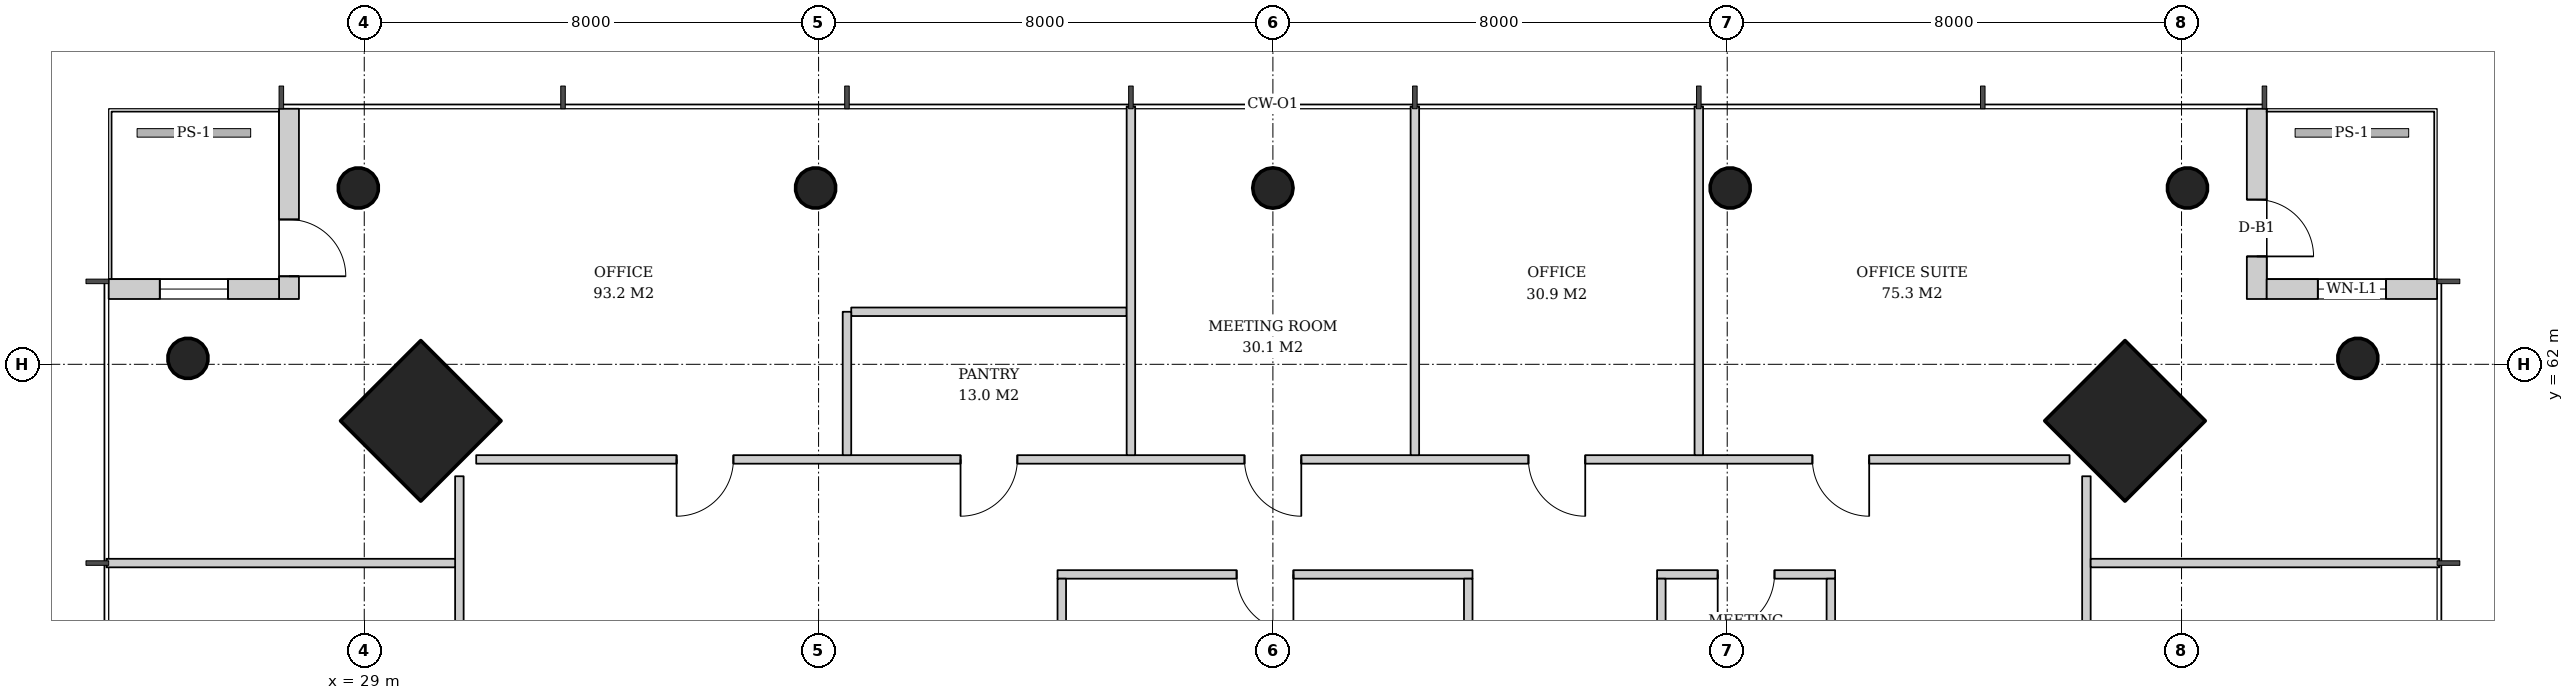
"""IFC4 building model, lengths in metres.
Left out: names, types, materials, properties, quantities, classifications, styles, units other than length and angle.
Written with IfcOpenShell. Run it as: python <this file> out.ifc"""

import sys

from ifc_helpers import new_model, si_unit, direction, frame, frame_2d, origin, origin_2d, place, context, subcontext, project, spatial, rectangle, hollow_circle, extrude, element, fill, save


model = new_model("IFC4")
c1 = context("Model", 3, precision=1e-05, world=origin(), true_north=direction((0.0, 1.0)))
c2 = subcontext(c1, "Body", "Model", "MODEL_VIEW")
j1 = project(units=[si_unit("LENGTHUNIT", "METRE"), si_unit("PLANEANGLEUNIT", "RADIAN")], contexts=[c1])
p1 = place(None, origin())
s1 = spatial("IfcSite", under=j1, at=p1, CompositionType="ELEMENT")
p2 = place(p1, origin())
s2 = spatial("IfcBuilding", under=s1, at=p2, CompositionType="ELEMENT")
p3 = place(p2, frame((0.0, 0.0, 173.0)))
s3 = spatial("IfcBuildingStorey", under=s2, at=p3, CompositionType="ELEMENT", Elevation=173.0)
p4 = place(p3, frame((60.043, 61.043, 0.0), z_axis=(-0.031962158256, -0.031962158256, 0.998977898093), x_axis=(0.707106781187, -0.707106781187, 0.0)))
e1 = element("IfcColumn", 1, at=p4, inside=s3, PredefinedType="COLUMN", context=c2, shape_type="SweptSolid", body=[
    extrude(rectangle(XDim=2.0, YDim=2.0, at=origin_2d()), origin(), (0.0, 0.0, 1.0), 3.804),
])
p5 = place(p3, frame((64.143, 62.143, 0.0), z_axis=(-0.031898107953, -0.031898107953, 0.998981992539), x_axis=(0.707106781187, -0.707106781187, 0.0)))
e2 = element("IfcColumn", 2, at=p5, inside=s3, PredefinedType="COLUMN", context=c2, shape_type="SweptSolid", body=[
    extrude(hollow_circle(Radius=0.355, WallThickness=0.025, at=origin_2d()), origin(), (0.0, 0.0, 1.0), 3.804),
])
p6 = place(p3, frame((29.957, 61.043, 0.0), z_axis=(0.031962158256, -0.031962158256, 0.998977898093), x_axis=(0.707106781187, 0.707106781187, 0.0)))
e3 = element("IfcColumn", 3, at=p6, inside=s3, PredefinedType="COLUMN", context=c2, shape_type="SweptSolid", body=[
    extrude(rectangle(XDim=2.0, YDim=2.0, at=origin_2d()), origin(), (0.0, 0.0, 1.0), 3.804),
])
for number, where, z_axis, x_axis in (
    (4, (61.143, 65.143, 0.0), (-0.032, -0.032, 0.999), (0.707, -0.707, 0.0)),
    (5, (28.857, 65.143, 0.0), (0.032, -0.032, 0.999), (0.707, 0.707, 0.0)),
):
    element("IfcColumn", number, at=place(p3, frame(where, z_axis=z_axis, x_axis=x_axis)), inside=s3, PredefinedType="COLUMN", context=c2, shape_type="SweptSolid", body=[
        extrude(hollow_circle(Radius=0.355, WallThickness=0.025, at=origin_2d()), origin(), (0.0, 0.0, 1.0), 3.804),
    ])
p7 = place(p3, frame((53.072, 65.143, 0.0), z_axis=(-0.015987237665, -0.031910269556, 0.999362868496), x_axis=(0.894067115991, -0.447933021895, 0.0)))
e6 = element("IfcColumn", 6, at=p7, inside=s3, PredefinedType="COLUMN", context=c2, shape_type="SweptSolid", body=[
    extrude(hollow_circle(Radius=0.355, WallThickness=0.025, at=origin_2d()), origin(), (0.0, 0.0, 1.0), 3.802),
])
p8 = place(p3, frame((45.0, 65.143, 0.0), z_axis=(0.0, -0.031914348339, 0.999490607445), x_axis=(1.0, 0.0, 0.0)))
e7 = element("IfcColumn", 7, at=p8, inside=s3, PredefinedType="COLUMN", context=c2, shape_type="SweptSolid", body=[
    extrude(hollow_circle(Radius=0.355, WallThickness=0.025, at=origin_2d()), origin(), (0.0, 0.0, 1.0), 3.802),
])
p9 = place(p3, frame((36.928, 65.143, 0.0), z_axis=(0.015987237665, -0.031910269556, 0.999362868496), x_axis=(0.894067115991, 0.447933021895, 0.0)))
e8 = element("IfcColumn", 8, at=p9, inside=s3, PredefinedType="COLUMN", context=c2, shape_type="SweptSolid", body=[
    extrude(hollow_circle(Radius=0.355, WallThickness=0.025, at=origin_2d()), origin(), (0.0, 0.0, 1.0), 3.802),
])
p10 = place(p3, frame((25.857, 62.143, 0.0), z_axis=(0.031898107953, -0.031898107953, 0.998981992539), x_axis=(0.707106781187, 0.707106781187, 0.0)))
e9 = element("IfcColumn", 9, at=p10, inside=s3, PredefinedType="COLUMN", context=c2, shape_type="SweptSolid", body=[
    extrude(hollow_circle(Radius=0.355, WallThickness=0.025, at=origin_2d()), origin(), (0.0, 0.0, 1.0), 3.804),
])
p11 = place(p3, frame((62.325, 66.5, 0.0), z_axis=(0.0, 0.0, 1.0), x_axis=(0.0, -1.0, 0.0)))
e10 = element("IfcWall", 10, at=p11, inside=s3, PredefinedType="SOLIDWALL", context=c2, shape_type="SweptSolid", body=[
    extrude(rectangle(XDim=3.35, YDim=0.35, at=frame_2d((1.675, 0.0))), origin(), (0.0, 0.0, 1.0), 3.62),
])
p12 = place(p11, frame((1.6, 0.0, 0.0)))
e11 = element("IfcOpeningElement", 11, at=p12, cuts=e10, PredefinedType="OPENING", context=c2, shape_type="SweptSolid", body=[
    extrude(rectangle(XDim=1.0, YDim=2.4, at=frame_2d((0.5, 1.2))), frame((0.0, 0.185, 0.0), z_axis=(0.0, -1.0, 0.0), x_axis=(1.0, 0.0, 0.0)), (0.0, 0.0, 1.0), 0.37),
])
p13 = place(p3, frame((62.5, 63.325, 0.0), z_axis=(0.0, 0.0, 1.0), x_axis=(1.0, 0.0, 0.0)))
e12 = element("IfcWall", 12, at=p13, inside=s3, PredefinedType="SOLIDWALL", context=c2, shape_type="SweptSolid", body=[
    extrude(rectangle(XDim=3.0, YDim=0.35, at=frame_2d((1.5, 0.0))), origin(), (0.0, 0.0, 1.0), 3.62),
])
p14 = place(p13, frame((0.9, 0.0, 0.6)))
e13 = element("IfcOpeningElement", 13, at=p14, cuts=e12, PredefinedType="OPENING", context=c2, shape_type="SweptSolid", body=[
    extrude(rectangle(XDim=1.2, YDim=2.55, at=frame_2d((0.6, 1.275))), frame((0.0, 0.185, 0.0), z_axis=(0.0, -1.0, 0.0), x_axis=(1.0, 0.0, 0.0)), (0.0, 0.0, 1.0), 0.37),
])
p15 = place(p3, frame((27.675, 66.5, 0.0), z_axis=(0.0, 0.0, 1.0), x_axis=(0.0, -1.0, 0.0)))
e14 = element("IfcWall", 14, at=p15, inside=s3, PredefinedType="SOLIDWALL", context=c2, shape_type="SweptSolid", body=[
    extrude(rectangle(XDim=3.35, YDim=0.35, at=frame_2d((1.675, 0.0))), origin(), (0.0, 0.0, 1.0), 3.62),
])
p16 = place(p15, frame((1.95, 0.0, 0.0)))
e15 = element("IfcOpeningElement", 15, at=p16, cuts=e14, PredefinedType="OPENING", context=c2, shape_type="SweptSolid", body=[
    extrude(rectangle(XDim=1.0, YDim=2.4, at=frame_2d((0.5, 1.2))), frame((0.0, 0.185, 0.0), z_axis=(0.0, -1.0, 0.0), x_axis=(1.0, 0.0, 0.0)), (0.0, 0.0, 1.0), 0.37),
])
p17 = place(p3, frame((27.5, 63.325, 0.0), z_axis=(0.0, 0.0, 1.0), x_axis=(-1.0, 0.0, 0.0)))
e16 = element("IfcWall", 16, at=p17, inside=s3, PredefinedType="SOLIDWALL", context=c2, shape_type="SweptSolid", body=[
    extrude(rectangle(XDim=3.0, YDim=0.35, at=frame_2d((1.5, 0.0))), origin(), (0.0, 0.0, 1.0), 3.62),
])
p18 = place(p17, frame((0.9, 0.0, 0.6)))
e17 = element("IfcOpeningElement", 17, at=p18, cuts=e16, PredefinedType="OPENING", context=c2, shape_type="SweptSolid", body=[
    extrude(rectangle(XDim=1.2, YDim=2.55, at=frame_2d((0.6, 1.275))), frame((0.0, 0.185, 0.0), z_axis=(0.0, -1.0, 0.0), x_axis=(1.0, 0.0, 0.0)), (0.0, 0.0, 1.0), 0.37),
])
p19 = place(p3, frame((54.9, 58.3, 0.0), z_axis=(0.0, 0.0, 1.0), x_axis=(-1.0, 0.0, 0.0)))
e18 = element("IfcWall", 18, at=p19, inside=s3, PredefinedType="PARTITIONING", context=c2, shape_type="SweptSolid", body=[
    extrude(rectangle(XDim=3.135, YDim=0.15, at=frame_2d((1.567, 0.0))), origin(), (0.0, 0.0, 1.0), 2.92),
])
p20 = place(p19, frame((1.067, 0.0, 0.0)))
e19 = element("IfcOpeningElement", 19, at=p20, cuts=e18, PredefinedType="OPENING", context=c2, shape_type="SweptSolid", body=[
    extrude(rectangle(XDim=1.0, YDim=2.1, at=frame_2d((0.5, 1.05))), frame((0.0, 0.085, 0.0), z_axis=(0.0, -1.0, 0.0), x_axis=(1.0, 0.0, 0.0)), (0.0, 0.0, 1.0), 0.17),
])
p21 = place(p3, frame((54.825, 55.9, 0.0), z_axis=(0.0, 0.0, 1.0), x_axis=(0.0, 1.0, 0.0)))
e20 = element("IfcWall", 20, at=p21, inside=s3, PredefinedType="PARTITIONING", context=c2, shape_type="SweptSolid", body=[
    extrude(rectangle(XDim=2.325, YDim=0.15, at=frame_2d((1.163, 0.0))), origin(), (0.0, 0.0, 1.0), 2.867),
])
p22 = place(p3, frame((51.84, 55.9, 0.0), z_axis=(0.0, 0.0, 1.0), x_axis=(0.0, 1.0, 0.0)))
e21 = element("IfcWall", 21, at=p22, inside=s3, PredefinedType="PARTITIONING", context=c2, shape_type="SweptSolid", body=[
    extrude(rectangle(XDim=2.325, YDim=0.15, at=frame_2d((1.163, 0.0))), origin(), (0.0, 0.0, 1.0), 3.62),
])
p23 = place(p3, frame((48.515, 58.3, 0.0), z_axis=(0.0, 0.0, 1.0), x_axis=(-1.0, 0.0, 0.0)))
e22 = element("IfcWall", 22, at=p23, inside=s3, PredefinedType="PARTITIONING", context=c2, shape_type="SweptSolid", body=[
    extrude(rectangle(XDim=7.307, YDim=0.15, at=frame_2d((3.654, 0.0))), origin(), (0.0, 0.0, 1.0), 2.867),
])
p24 = place(p23, frame((3.154, 0.0, 0.0)))
e23 = element("IfcOpeningElement", 23, at=p24, cuts=e22, PredefinedType="OPENING", context=c2, shape_type="SweptSolid", body=[
    extrude(rectangle(XDim=1.0, YDim=2.1, at=frame_2d((0.5, 1.05))), frame((0.0, 0.085, 0.0), z_axis=(0.0, -1.0, 0.0), x_axis=(1.0, 0.0, 0.0)), (0.0, 0.0, 1.0), 0.17),
])
for number, where, z_axis, x_axis in (
    (24, (48.44, 55.9, 0.0), (0.0, 0.0, 1.0), (0.0, 1.0, 0.0)),
    (25, (41.283, 55.9, 0.0), (0.0, 0.0, 1.0), (0.0, 1.0, 0.0)),
):
    element("IfcWall", number, at=place(p3, frame(where, z_axis=z_axis, x_axis=x_axis)), inside=s3, PredefinedType="PARTITIONING", context=c2, shape_type="SweptSolid", body=[
        extrude(rectangle(XDim=2.325, YDim=0.15, at=frame_2d((1.163, 0.0))), origin(), (0.0, 0.0, 1.0), 3.62),
    ])
p25 = place(p3, frame((59.325, 31.971, 0.0), z_axis=(0.0, 0.0, 1.0), x_axis=(0.0, 1.0, 0.0)))
e26 = element("IfcWall", 26, at=p25, inside=s3, PredefinedType="PARTITIONING", context=c2, shape_type="SweptSolid", body=[
    extrude(rectangle(XDim=28.057, YDim=0.15, at=frame_2d((14.029, 0.0))), origin(), (0.0, 0.0, 1.0), 2.867),
])
p26 = place(p25, frame((3.129, 0.0, 0.0)))
e27 = element("IfcOpeningElement", 27, at=p26, cuts=e26, PredefinedType="OPENING", context=c2, shape_type="SweptSolid", body=[
    extrude(rectangle(XDim=1.8, YDim=2.4, at=frame_2d((0.9, 1.2))), frame((0.0, 0.085, 0.0), z_axis=(0.0, -1.0, 0.0), x_axis=(1.0, 0.0, 0.0)), (0.0, 0.0, 1.0), 0.17),
])
p27 = place(p3, frame((59.4, 58.5, 0.0), z_axis=(0.0, 0.0, 1.0), x_axis=(1.0, 0.0, 0.0)))
e28 = element("IfcWall", 28, at=p27, inside=s3, PredefinedType="PARTITIONING", context=c2, shape_type="SweptSolid", body=[
    extrude(rectangle(XDim=6.14, YDim=0.15, at=frame_2d((3.07, 0.0))), origin(), (0.0, 0.0, 1.0), 3.12),
])
p28 = place(p3, frame((42.425, 62.925, 0.0), z_axis=(0.0, 0.0, 1.0), x_axis=(-1.0, 0.0, 0.0)))
e29 = element("IfcWall", 29, at=p28, inside=s3, PredefinedType="PARTITIONING", context=c2, shape_type="SweptSolid", body=[
    extrude(rectangle(XDim=4.85, YDim=0.15, at=frame_2d((2.425, 0.0))), origin(), (0.0, 0.0, 1.0), 2.867),
])
p29 = place(p3, frame((59.029, 60.325, 0.0), z_axis=(0.0, 0.0, 1.0), x_axis=(-1.0, 0.0, 0.0)))
e30 = element("IfcWall", 30, at=p29, inside=s3, PredefinedType="PARTITIONING", context=c2, shape_type="SweptSolid", body=[
    extrude(rectangle(XDim=28.057, YDim=0.15, at=frame_2d((14.029, 0.0))), origin(), (0.0, 0.0, 1.0), 2.867),
])
p30 = place(p29, frame((3.529, 0.0, 0.0)))
e31 = element("IfcOpeningElement", 31, at=p30, cuts=e30, PredefinedType="OPENING", context=c2, shape_type="SweptSolid", body=[
    extrude(rectangle(XDim=1.0, YDim=2.1, at=frame_2d((0.5, 1.05))), frame((0.0, 0.085, 0.0), z_axis=(0.0, -1.0, 0.0), x_axis=(1.0, 0.0, 0.0)), (0.0, 0.0, 1.0), 0.17),
])
p31 = place(p29, frame((8.529, 0.0, 0.0)))
e32 = element("IfcOpeningElement", 32, at=p31, cuts=e30, PredefinedType="OPENING", context=c2, shape_type="SweptSolid", body=[
    extrude(rectangle(XDim=1.0, YDim=2.1, at=frame_2d((0.5, 1.05))), frame((0.0, 0.085, 0.0), z_axis=(0.0, -1.0, 0.0), x_axis=(1.0, 0.0, 0.0)), (0.0, 0.0, 1.0), 0.17),
])
p32 = place(p29, frame((13.529, 0.0, 0.0)))
e33 = element("IfcOpeningElement", 33, at=p32, cuts=e30, PredefinedType="OPENING", context=c2, shape_type="SweptSolid", body=[
    extrude(rectangle(XDim=1.0, YDim=2.1, at=frame_2d((0.5, 1.05))), frame((0.0, 0.085, 0.0), z_axis=(0.0, -1.0, 0.0), x_axis=(1.0, 0.0, 0.0)), (0.0, 0.0, 1.0), 0.17),
])
p33 = place(p29, frame((18.529, 0.0, 0.0)))
e34 = element("IfcOpeningElement", 34, at=p33, cuts=e30, PredefinedType="OPENING", context=c2, shape_type="SweptSolid", body=[
    extrude(rectangle(XDim=1.0, YDim=2.1, at=frame_2d((0.5, 1.05))), frame((0.0, 0.085, 0.0), z_axis=(0.0, -1.0, 0.0), x_axis=(1.0, 0.0, 0.0)), (0.0, 0.0, 1.0), 0.17),
])
p34 = place(p29, frame((23.529, 0.0, 0.0)))
e35 = element("IfcOpeningElement", 35, at=p34, cuts=e30, PredefinedType="OPENING", context=c2, shape_type="SweptSolid", body=[
    extrude(rectangle(XDim=1.0, YDim=2.1, at=frame_2d((0.5, 1.05))), frame((0.0, 0.085, 0.0), z_axis=(0.0, -1.0, 0.0), x_axis=(1.0, 0.0, 0.0)), (0.0, 0.0, 1.0), 0.17),
])
for number, where, z_axis, x_axis in (
    (36, (52.5, 60.4, 0.0), (0.0, 0.0, 1.0), (0.0, 1.0, 0.0)),
    (37, (47.5, 60.4, 0.0), (0.0, 0.0, 1.0), (0.0, 1.0, 0.0)),
):
    element("IfcWall", number, at=place(p3, frame(where, z_axis=z_axis, x_axis=x_axis)), inside=s3, PredefinedType="PARTITIONING", context=c2, shape_type="SweptSolid", body=[
        extrude(rectangle(XDim=6.14, YDim=0.15, at=frame_2d((3.07, 0.0))), origin(), (0.0, 0.0, 1.0), 3.12),
    ])
p35 = place(p3, frame((42.5, 60.4, 0.0), z_axis=(0.0, 0.0, 1.0), x_axis=(0.0, 1.0, 0.0)))
e38 = element("IfcWall", 38, at=p35, inside=s3, PredefinedType="PARTITIONING", context=c2, shape_type="SweptSolid", body=[
    extrude(rectangle(XDim=6.14, YDim=0.15, at=frame_2d((3.07, 0.0))), origin(), (0.0, 0.0, 1.0), 2.867),
])
p36 = place(p3, frame((37.5, 60.4, 0.0), z_axis=(0.0, 0.0, 1.0), x_axis=(0.0, 1.0, 0.0)))
e39 = element("IfcWall", 39, at=p36, inside=s3, PredefinedType="PARTITIONING", context=c2, shape_type="SweptSolid", body=[
    extrude(rectangle(XDim=2.525, YDim=0.15, at=frame_2d((1.263, 0.0))), origin(), (0.0, 0.0, 1.0), 3.62),
])
p37 = place(p3, frame((30.675, 60.029, 0.0), z_axis=(0.0, 0.0, 1.0), x_axis=(0.0, -1.0, 0.0)))
e40 = element("IfcWall", 40, at=p37, inside=s3, PredefinedType="PARTITIONING", context=c2, shape_type="SweptSolid", body=[
    extrude(rectangle(XDim=28.057, YDim=0.15, at=frame_2d((14.029, 0.0))), origin(), (0.0, 0.0, 1.0), 2.867),
])
p38 = place(p37, frame((3.529, 0.0, 0.0)))
e41 = element("IfcOpeningElement", 41, at=p38, cuts=e40, PredefinedType="OPENING", context=c2, shape_type="SweptSolid", body=[
    extrude(rectangle(XDim=1.0, YDim=2.1, at=frame_2d((0.5, 1.05))), frame((0.0, 0.085, 0.0), z_axis=(0.0, -1.0, 0.0), x_axis=(1.0, 0.0, 0.0)), (0.0, 0.0, 1.0), 0.17),
])
p39 = place(p37, frame((8.529, 0.0, 0.0)))
e42 = element("IfcOpeningElement", 42, at=p39, cuts=e40, PredefinedType="OPENING", context=c2, shape_type="SweptSolid", body=[
    extrude(rectangle(XDim=1.0, YDim=2.1, at=frame_2d((0.5, 1.05))), frame((0.0, 0.085, 0.0), z_axis=(0.0, -1.0, 0.0), x_axis=(1.0, 0.0, 0.0)), (0.0, 0.0, 1.0), 0.17),
])
p40 = place(p37, frame((13.629, 0.0, 0.0)))
e43 = element("IfcOpeningElement", 43, at=p40, cuts=e40, PredefinedType="OPENING", context=c2, shape_type="SweptSolid", body=[
    extrude(rectangle(XDim=0.8, YDim=2.1, at=frame_2d((0.4, 1.05))), frame((0.0, 0.085, 0.0), z_axis=(0.0, -1.0, 0.0), x_axis=(1.0, 0.0, 0.0)), (0.0, 0.0, 1.0), 0.17),
])
p41 = place(p37, frame((18.529, 0.0, 0.0)))
e44 = element("IfcOpeningElement", 44, at=p41, cuts=e40, PredefinedType="OPENING", context=c2, shape_type="SweptSolid", body=[
    extrude(rectangle(XDim=1.0, YDim=2.1, at=frame_2d((0.5, 1.05))), frame((0.0, 0.085, 0.0), z_axis=(0.0, -1.0, 0.0), x_axis=(1.0, 0.0, 0.0)), (0.0, 0.0, 1.0), 0.17),
])
p42 = place(p37, frame((23.629, 0.0, 0.0)))
e45 = element("IfcOpeningElement", 45, at=p42, cuts=e40, PredefinedType="OPENING", context=c2, shape_type="SweptSolid", body=[
    extrude(rectangle(XDim=0.8, YDim=2.1, at=frame_2d((0.4, 1.05))), frame((0.0, 0.085, 0.0), z_axis=(0.0, -1.0, 0.0), x_axis=(1.0, 0.0, 0.0)), (0.0, 0.0, 1.0), 0.17),
])
p43 = place(p3, frame((30.6, 58.5, 0.0), z_axis=(0.0, 0.0, 1.0), x_axis=(-1.0, 0.0, 0.0)))
e46 = element("IfcWall", 46, at=p43, inside=s3, PredefinedType="PARTITIONING", context=c2, shape_type="SweptSolid", body=[
    extrude(rectangle(XDim=6.14, YDim=0.15, at=frame_2d((3.07, 0.0))), origin(), (0.0, 0.0, 1.0), 3.12),
])
p44 = place(p12, origin())
e47 = element("IfcDoor", 47, at=p44, inside=s3, OperationType="SINGLE_SWING_RIGHT", PredefinedType="DOOR", context=c2, shape_type="SweptSolid", body=[
    extrude(rectangle(XDim=1.0, YDim=2.4, at=frame_2d((0.5, 1.2))), frame((0.0, 0.025, 0.0), z_axis=(0.0, -1.0, 0.0), x_axis=(1.0, 0.0, 0.0)), (0.0, 0.0, 1.0), 0.05),
])
fill(e11, e47)
p45 = place(p14, origin())
e48 = element("IfcWindow", 48, at=p45, inside=s3, PartitioningType="SINGLE_PANEL", PredefinedType="WINDOW", context=c2, shape_type="SweptSolid", body=[
    extrude(rectangle(XDim=1.2, YDim=2.55, at=frame_2d((0.6, 1.275))), frame((0.0, 0.03, 0.0), z_axis=(0.0, -1.0, 0.0), x_axis=(1.0, 0.0, 0.0)), (0.0, 0.0, 1.0), 0.06),
])
fill(e13, e48)
p46 = place(p16, origin())
e49 = element("IfcDoor", 49, at=p46, inside=s3, OperationType="SINGLE_SWING_RIGHT", PredefinedType="DOOR", context=c2, shape_type="SweptSolid", body=[
    extrude(rectangle(XDim=1.0, YDim=2.4, at=frame_2d((0.5, 1.2))), frame((0.0, 0.025, 0.0), z_axis=(0.0, -1.0, 0.0), x_axis=(1.0, 0.0, 0.0)), (0.0, 0.0, 1.0), 0.05),
])
fill(e15, e49)
p47 = place(p18, origin())
e50 = element("IfcWindow", 50, at=p47, inside=s3, PartitioningType="SINGLE_PANEL", PredefinedType="WINDOW", context=c2, shape_type="SweptSolid", body=[
    extrude(rectangle(XDim=1.2, YDim=2.55, at=frame_2d((0.6, 1.275))), frame((0.0, 0.03, 0.0), z_axis=(0.0, -1.0, 0.0), x_axis=(1.0, 0.0, 0.0)), (0.0, 0.0, 1.0), 0.06),
])
fill(e17, e50)
p48 = place(p20, origin())
e51 = element("IfcDoor", 51, at=p48, inside=s3, OperationType="SINGLE_SWING_RIGHT", PredefinedType="DOOR", context=c2, shape_type="SweptSolid", body=[
    extrude(rectangle(XDim=1.0, YDim=2.1, at=frame_2d((0.5, 1.05))), frame((0.0, 0.025, 0.0), z_axis=(0.0, -1.0, 0.0), x_axis=(1.0, 0.0, 0.0)), (0.0, 0.0, 1.0), 0.05),
])
fill(e19, e51)
p49 = place(p24, origin())
e52 = element("IfcDoor", 52, at=p49, inside=s3, OperationType="SINGLE_SWING_LEFT", PredefinedType="DOOR", context=c2, shape_type="SweptSolid", body=[
    extrude(rectangle(XDim=1.0, YDim=2.1, at=frame_2d((0.5, 1.05))), frame((0.0, 0.025, 0.0), z_axis=(0.0, -1.0, 0.0), x_axis=(1.0, 0.0, 0.0)), (0.0, 0.0, 1.0), 0.05),
])
fill(e23, e52)
p50 = place(p30, origin())
e53 = element("IfcDoor", 53, at=p50, inside=s3, OperationType="SINGLE_SWING_LEFT", PredefinedType="DOOR", context=c2, shape_type="SweptSolid", body=[
    extrude(rectangle(XDim=1.0, YDim=2.1, at=frame_2d((0.5, 1.05))), frame((0.0, 0.025, 0.0), z_axis=(0.0, -1.0, 0.0), x_axis=(1.0, 0.0, 0.0)), (0.0, 0.0, 1.0), 0.05),
])
fill(e31, e53)
p51 = place(p31, origin())
e54 = element("IfcDoor", 54, at=p51, inside=s3, OperationType="SINGLE_SWING_LEFT", PredefinedType="DOOR", context=c2, shape_type="SweptSolid", body=[
    extrude(rectangle(XDim=1.0, YDim=2.1, at=frame_2d((0.5, 1.05))), frame((0.0, 0.025, 0.0), z_axis=(0.0, -1.0, 0.0), x_axis=(1.0, 0.0, 0.0)), (0.0, 0.0, 1.0), 0.05),
])
fill(e32, e54)
p52 = place(p32, origin())
e55 = element("IfcDoor", 55, at=p52, inside=s3, OperationType="SINGLE_SWING_LEFT", PredefinedType="DOOR", context=c2, shape_type="SweptSolid", body=[
    extrude(rectangle(XDim=1.0, YDim=2.1, at=frame_2d((0.5, 1.05))), frame((0.0, 0.025, 0.0), z_axis=(0.0, -1.0, 0.0), x_axis=(1.0, 0.0, 0.0)), (0.0, 0.0, 1.0), 0.05),
])
fill(e33, e55)
p53 = place(p33, origin())
e56 = element("IfcDoor", 56, at=p53, inside=s3, OperationType="SINGLE_SWING_RIGHT", PredefinedType="DOOR", context=c2, shape_type="SweptSolid", body=[
    extrude(rectangle(XDim=1.0, YDim=2.1, at=frame_2d((0.5, 1.05))), frame((0.0, 0.025, 0.0), z_axis=(0.0, -1.0, 0.0), x_axis=(1.0, 0.0, 0.0)), (0.0, 0.0, 1.0), 0.05),
])
fill(e34, e56)
p54 = place(p34, origin())
e57 = element("IfcDoor", 57, at=p54, inside=s3, OperationType="SINGLE_SWING_RIGHT", PredefinedType="DOOR", context=c2, shape_type="SweptSolid", body=[
    extrude(rectangle(XDim=1.0, YDim=2.1, at=frame_2d((0.5, 1.05))), frame((0.0, 0.025, 0.0), z_axis=(0.0, -1.0, 0.0), x_axis=(1.0, 0.0, 0.0)), (0.0, 0.0, 1.0), 0.05),
])
fill(e35, e57)
save(model, sys.argv[1])
